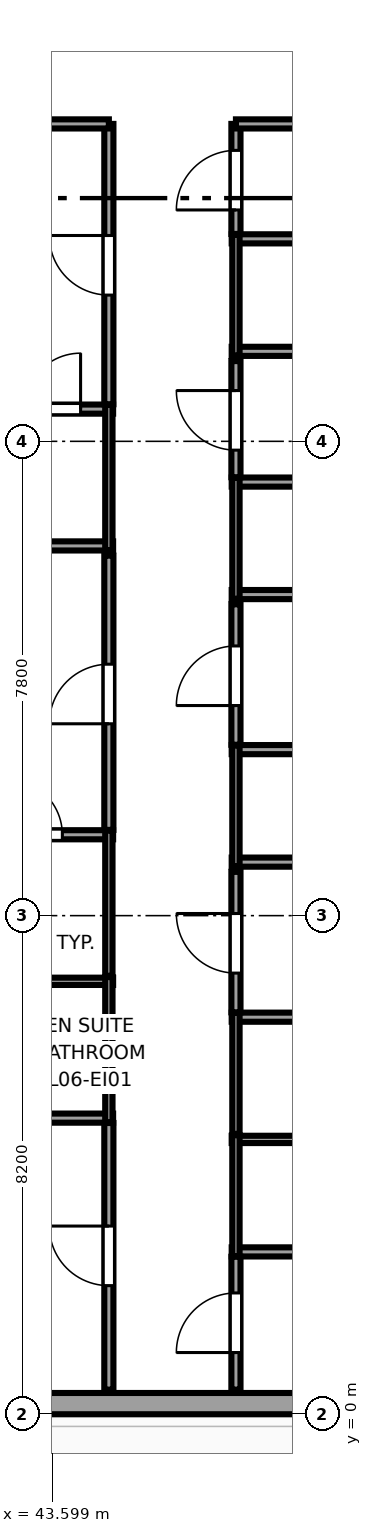
"""IFC4 building model, lengths in metres.
Left out: names, types, materials, properties, quantities, classifications, styles, units other than length and angle.
Written with IfcOpenShell. Run it as: python <this file> out.ifc"""

import sys

from ifc_helpers import new_model, si_unit, direction, frame, frame_2d, origin, place, context, subcontext, project, spatial, rectangle, extrude, source, transform, mapped, element, fill, save


model = new_model("IFC4")
c1 = context("Model", 3, precision=1e-05, world=origin(), true_north=direction((0.0, 1.0)))
c2 = subcontext(c1, "Body", "Model", "MODEL_VIEW")
j1 = project(units=[si_unit("LENGTHUNIT", "METRE"), si_unit("PLANEANGLEUNIT", "RADIAN")], contexts=[c1])
p1 = place(None, origin())
s1 = spatial("IfcSite", under=j1, at=p1, CompositionType="ELEMENT")
p2 = place(p1, origin())
s2 = spatial("IfcBuilding", under=s1, at=p2, CompositionType="ELEMENT")
p3 = place(p2, frame((0.0, 0.0, 32.0)))
s3 = spatial("IfcBuildingStorey", under=s2, at=p3, CompositionType="ELEMENT", Elevation=32.0)
p4 = place(p3, frame((34.375, 0.175, 0.0), z_axis=(0.0, 0.0, 1.0), x_axis=(1.0, 0.0, 0.0)))
e1 = element("IfcWall", 1, at=p4, inside=s3, PredefinedType="SOLIDWALL", context=c2, shape_type="SweptSolid", body=[
    extrude(rectangle(XDim=18.008, YDim=0.35, at=frame_2d((9.004, 0.0))), origin(), (0.0, 0.0, 1.0), 3.37),
])
p5 = place(p4, frame((1.651, 0.0, 0.68)))
e2 = element("IfcOpeningElement", 2, at=p5, cuts=e1, PredefinedType="OPENING", context=c2, shape_type="SweptSolid", body=[
    extrude(rectangle(XDim=2.1, YDim=1.9, at=frame_2d((1.05, 0.95))), frame((0.0, 0.185, 0.0), z_axis=(0.0, -1.0, 0.0), x_axis=(1.0, 0.0, 0.0)), (0.0, 0.0, 1.0), 0.37),
])
p6 = place(p4, frame((15.725, 0.0, 0.62)))
e3 = element("IfcOpeningElement", 3, at=p6, cuts=e1, PredefinedType="OPENING", context=c2, shape_type="SweptSolid", body=[
    extrude(rectangle(XDim=1.5, YDim=1.55, at=frame_2d((0.75, 0.775))), frame((0.0, 0.185, 0.0), z_axis=(0.0, -1.0, 0.0), x_axis=(1.0, 0.0, 0.0)), (0.0, 0.0, 1.0), 0.37),
])
p7 = place(p3, frame((42.01, 4.87, 0.0), z_axis=(0.0, 0.0, 1.0), x_axis=(1.0, 0.0, 0.0)))
e4 = element("IfcWall", 4, at=p7, inside=s3, PredefinedType="PARTITIONING", context=c2, shape_type="SweptSolid", body=[
    extrude(rectangle(XDim=2.59, YDim=0.15, at=frame_2d((1.295, 0.0))), origin(), (0.0, 0.0, 1.0), 3.37),
])
p8 = place(p3, frame((42.01, 7.12, 0.0), z_axis=(0.0, 0.0, 1.0), x_axis=(1.0, 0.0, 0.0)))
e5 = element("IfcWall", 5, at=p8, inside=s3, PredefinedType="PLUMBINGWALL", context=c2, shape_type="SweptSolid", body=[
    extrude(rectangle(XDim=2.59, YDim=0.12, at=frame_2d((1.295, 0.0))), origin(), (0.0, 0.0, 1.0), 3.37),
])
p9 = place(p3, frame((44.53, 4.8, 0.0), z_axis=(0.0, 0.0, 1.0), x_axis=(0.0, 1.0, 0.0)))
e6 = element("IfcWall", 6, at=p9, inside=s3, PredefinedType="PLUMBINGWALL", context=c2, shape_type="SweptSolid", body=[
    extrude(rectangle(XDim=2.39, YDim=0.12, at=frame_2d((1.195, 0.0))), origin(), (0.0, 0.0, 1.0), 3.37),
])
p10 = place(p3, frame((42.01, 9.53, 0.0), z_axis=(0.0, 0.0, 1.0), x_axis=(1.0, 0.0, 0.0)))
e7 = element("IfcWall", 7, at=p10, inside=s3, PredefinedType="PARTITIONING", context=c2, shape_type="SweptSolid", body=[
    extrude(rectangle(XDim=2.59, YDim=0.15, at=frame_2d((1.295, 0.0))), origin(), (0.0, 0.0, 1.0), 3.37),
])
p11 = place(p10, frame((0.835, 0.0, 0.0)))
e8 = element("IfcOpeningElement", 8, at=p11, cuts=e7, PredefinedType="OPENING", context=c2, shape_type="SweptSolid", body=[
    extrude(rectangle(XDim=0.92, YDim=2.01, at=frame_2d((0.46, 1.005))), frame((0.0, 0.085, 0.0), z_axis=(0.0, -1.0, 0.0), x_axis=(1.0, 0.0, 0.0)), (0.0, 0.0, 1.0), 0.17),
])
p12 = place(p3, frame((44.53, 7.21, 0.0), z_axis=(0.0, 0.0, 1.0), x_axis=(0.0, 1.0, 0.0)))
e9 = element("IfcWall", 9, at=p12, inside=s3, PredefinedType="PLUMBINGWALL", context=c2, shape_type="SweptSolid", body=[
    extrude(rectangle(XDim=2.39, YDim=0.12, at=frame_2d((1.195, 0.0))), origin(), (0.0, 0.0, 1.0), 3.37),
])
p13 = place(p3, frame((34.65, 14.28, 0.0), z_axis=(0.0, 0.0, 1.0), x_axis=(1.0, 0.0, 0.0)))
e10 = element("IfcWall", 10, at=p13, inside=s3, PredefinedType="PARTITIONING", context=c2, shape_type="SweptSolid", body=[
    extrude(rectangle(XDim=9.95, YDim=0.15, at=frame_2d((4.975, 0.0))), origin(), (0.0, 0.0, 1.0), 3.37),
])
p14 = place(p3, frame((42.01, 16.53, 0.0), z_axis=(0.0, 0.0, 1.0), x_axis=(1.0, 0.0, 0.0)))
e11 = element("IfcWall", 11, at=p14, inside=s3, PredefinedType="PARTITIONING", context=c2, shape_type="SweptSolid", body=[
    extrude(rectangle(XDim=2.59, YDim=0.15, at=frame_2d((1.295, 0.0))), origin(), (0.0, 0.0, 1.0), 3.37),
])
p15 = place(p14, frame((1.135, 0.0, 0.0)))
e12 = element("IfcOpeningElement", 12, at=p15, cuts=e11, PredefinedType="OPENING", context=c2, shape_type="SweptSolid", body=[
    extrude(rectangle(XDim=0.92, YDim=2.01, at=frame_2d((0.46, 1.005))), frame((0.0, 0.085, 0.0), z_axis=(0.0, -1.0, 0.0), x_axis=(1.0, 0.0, 0.0)), (0.0, 0.0, 1.0), 0.17),
])
p16 = place(p3, frame((44.53, 14.21, 0.0), z_axis=(0.0, 0.0, 1.0), x_axis=(0.0, 1.0, 0.0)))
e13 = element("IfcWall", 13, at=p16, inside=s3, PredefinedType="PLUMBINGWALL", context=c2, shape_type="SweptSolid", body=[
    extrude(rectangle(XDim=2.39, YDim=0.12, at=frame_2d((1.195, 0.0))), origin(), (0.0, 0.0, 1.0), 3.37),
])
p17 = place(p3, frame((46.55, 2.67, 0.0), z_axis=(0.0, 0.0, 1.0), x_axis=(1.0, 0.0, 0.0)))
e14 = element("IfcWall", 14, at=p17, inside=s3, PredefinedType="PARTITIONING", context=c2, shape_type="SweptSolid", body=[
    extrude(rectangle(XDim=2.59, YDim=0.15, at=frame_2d((1.295, 0.0))), origin(), (0.0, 0.0, 1.0), 3.37),
])
p18 = place(p3, frame((46.55, 4.52, 0.0), z_axis=(0.0, 0.0, 1.0), x_axis=(1.0, 0.0, 0.0)))
e15 = element("IfcWall", 15, at=p18, inside=s3, PredefinedType="PLUMBINGWALL", context=c2, shape_type="SweptSolid", body=[
    extrude(rectangle(XDim=2.59, YDim=0.12, at=frame_2d((1.295, 0.0))), origin(), (0.0, 0.0, 1.0), 3.37),
])
p19 = place(p3, frame((46.62, 2.6, 0.0), z_axis=(0.0, 0.0, 1.0), x_axis=(0.0, 1.0, 0.0)))
e16 = element("IfcWall", 16, at=p19, inside=s3, PredefinedType="PLUMBINGWALL", context=c2, shape_type="SweptSolid", body=[
    extrude(rectangle(XDim=1.99, YDim=0.12, at=frame_2d((0.995, 0.0))), origin(), (0.0, 0.0, 1.0), 3.37),
])
p20 = place(p3, frame((46.55, 6.53, 0.0), z_axis=(0.0, 0.0, 1.0), x_axis=(1.0, 0.0, 0.0)))
e17 = element("IfcWall", 17, at=p20, inside=s3, PredefinedType="PARTITIONING", context=c2, shape_type="SweptSolid", body=[
    extrude(rectangle(XDim=2.59, YDim=0.15, at=frame_2d((1.295, 0.0))), origin(), (0.0, 0.0, 1.0), 3.37),
])
p21 = place(p3, frame((46.62, 4.61, 0.0), z_axis=(0.0, 0.0, 1.0), x_axis=(0.0, 1.0, 0.0)))
e18 = element("IfcWall", 18, at=p21, inside=s3, PredefinedType="PLUMBINGWALL", context=c2, shape_type="SweptSolid", body=[
    extrude(rectangle(XDim=1.99, YDim=0.12, at=frame_2d((0.995, 0.0))), origin(), (0.0, 0.0, 1.0), 3.37),
])
p22 = place(p3, frame((46.55, 9.08, 0.0), z_axis=(0.0, 0.0, 1.0), x_axis=(1.0, 0.0, 0.0)))
e19 = element("IfcWall", 19, at=p22, inside=s3, PredefinedType="PARTITIONING", context=c2, shape_type="SweptSolid", body=[
    extrude(rectangle(XDim=10.045, YDim=0.15, at=frame_2d((5.022, 0.0))), origin(), (0.0, 0.0, 1.0), 3.37),
])
p23 = place(p3, frame((46.55, 10.93, 0.0), z_axis=(0.0, 0.0, 1.0), x_axis=(1.0, 0.0, 0.0)))
e20 = element("IfcWall", 20, at=p23, inside=s3, PredefinedType="PARTITIONING", context=c2, shape_type="SweptSolid", body=[
    extrude(rectangle(XDim=2.59, YDim=0.15, at=frame_2d((1.295, 0.0))), origin(), (0.0, 0.0, 1.0), 3.37),
])
p24 = place(p3, frame((46.62, 9.01, 0.0), z_axis=(0.0, 0.0, 1.0), x_axis=(0.0, 1.0, 0.0)))
e21 = element("IfcWall", 21, at=p24, inside=s3, PredefinedType="PLUMBINGWALL", context=c2, shape_type="SweptSolid", body=[
    extrude(rectangle(XDim=1.99, YDim=0.12, at=frame_2d((0.995, 0.0))), origin(), (0.0, 0.0, 1.0), 3.37),
])
p25 = place(p3, frame((46.55, 13.48, 0.0), z_axis=(0.0, 0.0, 1.0), x_axis=(1.0, 0.0, 0.0)))
e22 = element("IfcWall", 22, at=p25, inside=s3, PredefinedType="PARTITIONING", context=c2, shape_type="SweptSolid", body=[
    extrude(rectangle(XDim=10.045, YDim=0.15, at=frame_2d((5.022, 0.0))), origin(), (0.0, 0.0, 1.0), 3.37),
])
p26 = place(p3, frame((46.55, 15.33, 0.0), z_axis=(0.0, 0.0, 1.0), x_axis=(1.0, 0.0, 0.0)))
e23 = element("IfcWall", 23, at=p26, inside=s3, PredefinedType="PARTITIONING", context=c2, shape_type="SweptSolid", body=[
    extrude(rectangle(XDim=2.59, YDim=0.15, at=frame_2d((1.295, 0.0))), origin(), (0.0, 0.0, 1.0), 3.37),
])
p27 = place(p3, frame((46.62, 13.41, 0.0), z_axis=(0.0, 0.0, 1.0), x_axis=(0.0, 1.0, 0.0)))
e24 = element("IfcWall", 24, at=p27, inside=s3, PredefinedType="PLUMBINGWALL", context=c2, shape_type="SweptSolid", body=[
    extrude(rectangle(XDim=1.99, YDim=0.12, at=frame_2d((0.995, 0.0))), origin(), (0.0, 0.0, 1.0), 3.37),
])
p28 = place(p3, frame((46.55, 17.48, 0.0), z_axis=(0.0, 0.0, 1.0), x_axis=(1.0, 0.0, 0.0)))
e25 = element("IfcWall", 25, at=p28, inside=s3, PredefinedType="PARTITIONING", context=c2, shape_type="SweptSolid", body=[
    extrude(rectangle(XDim=10.045, YDim=0.15, at=frame_2d((5.022, 0.0))), origin(), (0.0, 0.0, 1.0), 3.37),
])
p29 = place(p3, frame((46.55, 19.33, 0.0), z_axis=(0.0, 0.0, 1.0), x_axis=(1.0, 0.0, 0.0)))
e26 = element("IfcWall", 26, at=p29, inside=s3, PredefinedType="PARTITIONING", context=c2, shape_type="SweptSolid", body=[
    extrude(rectangle(XDim=2.59, YDim=0.15, at=frame_2d((1.295, 0.0))), origin(), (0.0, 0.0, 1.0), 3.37),
])
p30 = place(p3, frame((46.62, 17.41, 0.0), z_axis=(0.0, 0.0, 1.0), x_axis=(0.0, 1.0, 0.0)))
e27 = element("IfcWall", 27, at=p30, inside=s3, PredefinedType="PLUMBINGWALL", context=c2, shape_type="SweptSolid", body=[
    extrude(rectangle(XDim=1.99, YDim=0.12, at=frame_2d((0.995, 0.0))), origin(), (0.0, 0.0, 1.0), 3.37),
])
p31 = place(p3, frame((44.53, 0.405, 0.0), z_axis=(0.0, 0.0, 1.0), x_axis=(0.0, 1.0, 0.0)))
e28 = element("IfcWall", 28, at=p31, inside=s3, PredefinedType="PARTITIONING", context=c2, shape_type="SweptSolid", body=[
    extrude(rectangle(XDim=4.385, YDim=0.15, at=frame_2d((2.192, 0.0))), origin(), (0.0, 0.0, 1.0), 3.37),
])
p32 = place(p31, frame((1.71, 0.0, 0.0)))
e29 = element("IfcOpeningElement", 29, at=p32, cuts=e28, PredefinedType="OPENING", context=c2, shape_type="SweptSolid", body=[
    extrude(rectangle(XDim=0.98, YDim=2.12, at=frame_2d((0.49, 1.06))), frame((0.0, 0.085, 0.0), z_axis=(0.0, -1.0, 0.0), x_axis=(1.0, 0.0, 0.0)), (0.0, 0.0, 1.0), 0.17),
])
p33 = place(p3, frame((44.53, 9.61, 0.0), z_axis=(0.0, 0.0, 1.0), x_axis=(0.0, 1.0, 0.0)))
e30 = element("IfcWall", 30, at=p33, inside=s3, PredefinedType="PARTITIONING", context=c2, shape_type="SweptSolid", body=[
    extrude(rectangle(XDim=4.51, YDim=0.15, at=frame_2d((2.255, 0.0))), origin(), (0.0, 0.0, 1.0), 3.37),
])
p34 = place(p33, frame((1.745, 0.0, 0.0)))
e31 = element("IfcOpeningElement", 31, at=p34, cuts=e30, PredefinedType="OPENING", context=c2, shape_type="SweptSolid", body=[
    extrude(rectangle(XDim=0.98, YDim=2.12, at=frame_2d((0.49, 1.06))), frame((0.0, 0.085, 0.0), z_axis=(0.0, -1.0, 0.0), x_axis=(1.0, 0.0, 0.0)), (0.0, 0.0, 1.0), 0.17),
])
p35 = place(p3, frame((44.53, 16.61, 0.0), z_axis=(0.0, 0.0, 1.0), x_axis=(0.0, 1.0, 0.0)))
e32 = element("IfcWall", 32, at=p35, inside=s3, PredefinedType="PARTITIONING", context=c2, shape_type="SweptSolid", body=[
    extrude(rectangle(XDim=4.61, YDim=0.15, at=frame_2d((2.305, 0.0))), origin(), (0.0, 0.0, 1.0), 3.37),
])
p36 = place(p35, frame((1.795, 0.0, 0.0)))
e33 = element("IfcOpeningElement", 33, at=p36, cuts=e32, PredefinedType="OPENING", context=c2, shape_type="SweptSolid", body=[
    extrude(rectangle(XDim=0.98, YDim=2.12, at=frame_2d((0.49, 1.06))), frame((0.0, 0.085, 0.0), z_axis=(0.0, -1.0, 0.0), x_axis=(1.0, 0.0, 0.0)), (0.0, 0.0, 1.0), 0.17),
])
p37 = place(p3, frame((34.65, 21.22, 0.0), z_axis=(0.0, 0.0, 1.0), x_axis=(1.0, 0.0, 0.0)))
e34 = element("IfcWall", 34, at=p37, inside=s3, PredefinedType="PARTITIONING", context=c2, shape_type="SweptSolid", body=[
    extrude(rectangle(XDim=9.88, YDim=0.15, at=frame_2d((4.94, 0.0))), origin(), (0.0, 0.0, 1.0), 3.37),
])
p38 = place(p3, frame((46.62, 0.405, 0.0), z_axis=(0.0, 0.0, 1.0), x_axis=(0.0, 1.0, 0.0)))
e35 = element("IfcWall", 35, at=p38, inside=s3, PredefinedType="PARTITIONING", context=c2, shape_type="SweptSolid", body=[
    extrude(rectangle(XDim=2.185, YDim=0.15, at=frame_2d((1.093, 0.0))), origin(), (0.0, 0.0, 1.0), 3.37),
])
p39 = place(p38, frame((0.61, 0.0, 0.0)))
e36 = element("IfcOpeningElement", 36, at=p39, cuts=e35, PredefinedType="OPENING", context=c2, shape_type="SweptSolid", body=[
    extrude(rectangle(XDim=0.98, YDim=2.12, at=frame_2d((0.49, 1.06))), frame((0.0, 0.085, 0.0), z_axis=(0.0, -1.0, 0.0), x_axis=(1.0, 0.0, 0.0)), (0.0, 0.0, 1.0), 0.17),
])
p40 = place(p3, frame((46.62, 6.61, 0.0), z_axis=(0.0, 0.0, 1.0), x_axis=(0.0, 1.0, 0.0)))
e37 = element("IfcWall", 37, at=p40, inside=s3, PredefinedType="PARTITIONING", context=c2, shape_type="SweptSolid", body=[
    extrude(rectangle(XDim=2.31, YDim=0.15, at=frame_2d((1.155, 0.0))), origin(), (0.0, 0.0, 1.0), 3.37),
])
p41 = place(p40, frame((0.645, 0.0, 0.0)))
e38 = element("IfcOpeningElement", 38, at=p41, cuts=e37, PredefinedType="OPENING", context=c2, shape_type="SweptSolid", body=[
    extrude(rectangle(XDim=0.98, YDim=2.12, at=frame_2d((0.49, 1.06))), frame((0.0, 0.085, 0.0), z_axis=(0.0, -1.0, 0.0), x_axis=(1.0, 0.0, 0.0)), (0.0, 0.0, 1.0), 0.17),
])
p42 = place(p3, frame((46.62, 11.01, 0.0), z_axis=(0.0, 0.0, 1.0), x_axis=(0.0, 1.0, 0.0)))
e39 = element("IfcWall", 39, at=p42, inside=s3, PredefinedType="PARTITIONING", context=c2, shape_type="SweptSolid", body=[
    extrude(rectangle(XDim=2.31, YDim=0.15, at=frame_2d((1.155, 0.0))), origin(), (0.0, 0.0, 1.0), 3.37),
])
p43 = place(p42, frame((0.645, 0.0, 0.0)))
e40 = element("IfcOpeningElement", 40, at=p43, cuts=e39, PredefinedType="OPENING", context=c2, shape_type="SweptSolid", body=[
    extrude(rectangle(XDim=0.98, YDim=2.12, at=frame_2d((0.49, 1.06))), frame((0.0, 0.085, 0.0), z_axis=(0.0, -1.0, 0.0), x_axis=(1.0, 0.0, 0.0)), (0.0, 0.0, 1.0), 0.17),
])
p44 = place(p3, frame((46.62, 15.41, 0.0), z_axis=(0.0, 0.0, 1.0), x_axis=(0.0, 1.0, 0.0)))
e41 = element("IfcWall", 41, at=p44, inside=s3, PredefinedType="PARTITIONING", context=c2, shape_type="SweptSolid", body=[
    extrude(rectangle(XDim=1.91, YDim=0.15, at=frame_2d((0.955, 0.0))), origin(), (0.0, 0.0, 1.0), 3.37),
])
p45 = place(p44, frame((0.445, 0.0, 0.0)))
e42 = element("IfcOpeningElement", 42, at=p45, cuts=e41, PredefinedType="OPENING", context=c2, shape_type="SweptSolid", body=[
    extrude(rectangle(XDim=0.98, YDim=2.12, at=frame_2d((0.49, 1.06))), frame((0.0, 0.085, 0.0), z_axis=(0.0, -1.0, 0.0), x_axis=(1.0, 0.0, 0.0)), (0.0, 0.0, 1.0), 0.17),
])
p46 = place(p3, frame((46.62, 19.41, 0.0), z_axis=(0.0, 0.0, 1.0), x_axis=(0.0, 1.0, 0.0)))
e43 = element("IfcWall", 43, at=p46, inside=s3, PredefinedType="PARTITIONING", context=c2, shape_type="SweptSolid", body=[
    extrude(rectangle(XDim=1.81, YDim=0.15, at=frame_2d((0.905, 0.0))), origin(), (0.0, 0.0, 1.0), 3.37),
])
p47 = place(p46, frame((0.395, 0.0, 0.0)))
e44 = element("IfcOpeningElement", 44, at=p47, cuts=e43, PredefinedType="OPENING", context=c2, shape_type="SweptSolid", body=[
    extrude(rectangle(XDim=0.98, YDim=2.12, at=frame_2d((0.49, 1.06))), frame((0.0, 0.085, 0.0), z_axis=(0.0, -1.0, 0.0), x_axis=(1.0, 0.0, 0.0)), (0.0, 0.0, 1.0), 0.17),
])
p48 = place(p3, frame((46.62, 21.22, 0.0), z_axis=(0.0, 0.0, 1.0), x_axis=(1.0, 0.0, 0.0)))
e45 = element("IfcWall", 45, at=p48, inside=s3, PredefinedType="PARTITIONING", context=c2, shape_type="SweptSolid", body=[
    extrude(rectangle(XDim=9.975, YDim=0.15, at=frame_2d((4.987, 0.0))), origin(), (0.0, 0.0, 1.0), 3.37),
])
m1 = source(origin(), c2, "Body", "SweptSolid", [
    extrude(rectangle(XDim=0.92, YDim=2.01, at=frame_2d((0.46, 1.005))), frame((0.0, 0.025, 0.0), z_axis=(0.0, -1.0, 0.0), x_axis=(1.0, 0.0, 0.0)), (0.0, 0.0, 1.0), 0.05),
])
p49 = place(p11, origin())
e46 = element("IfcDoor", 46, at=p49, inside=s3, OperationType="SINGLE_SWING_LEFT", PredefinedType="DOOR", context=c2, shape_type="MappedRepresentation", body=[
    mapped(m1, transform((0.0, 0.0, 0.0), x_axis=(1.0, 0.0, 0.0), y_axis=(0.0, 1.0, 0.0), z_axis=(0.0, 0.0, 1.0), scale=1.0)),
])
fill(e8, e46)
p50 = place(p15, origin())
e47 = element("IfcDoor", 47, at=p50, inside=s3, OperationType="SINGLE_SWING_RIGHT", PredefinedType="DOOR", context=c2, shape_type="MappedRepresentation", body=[
    mapped(m1, transform((0.0, 0.0, 0.0), x_axis=(1.0, 0.0, 0.0), y_axis=(0.0, 1.0, 0.0), z_axis=(0.0, 0.0, 1.0), scale=1.0)),
])
fill(e12, e47)
m2 = source(origin(), c2, "Body", "SweptSolid", [
    extrude(rectangle(XDim=0.98, YDim=2.12, at=frame_2d((0.49, 1.06))), frame((0.0, 0.025, 0.0), z_axis=(0.0, -1.0, 0.0), x_axis=(1.0, 0.0, 0.0)), (0.0, 0.0, 1.0), 0.05),
])
p51 = place(p32, origin())
e48 = element("IfcDoor", 48, at=p51, inside=s3, OperationType="SINGLE_SWING_RIGHT", PredefinedType="DOOR", context=c2, shape_type="MappedRepresentation", body=[
    mapped(m2, transform((0.0, 0.0, 0.0), x_axis=(1.0, 0.0, 0.0), y_axis=(0.0, 1.0, 0.0), z_axis=(0.0, 0.0, 1.0), scale=1.0)),
])
fill(e29, e48)
p52 = place(p34, origin())
e49 = element("IfcDoor", 49, at=p52, inside=s3, OperationType="SINGLE_SWING_LEFT", PredefinedType="DOOR", context=c2, shape_type="MappedRepresentation", body=[
    mapped(m2, transform((0.0, 0.0, 0.0), x_axis=(1.0, 0.0, 0.0), y_axis=(0.0, 1.0, 0.0), z_axis=(0.0, 0.0, 1.0), scale=1.0)),
])
fill(e31, e49)
p53 = place(p36, origin())
e50 = element("IfcDoor", 50, at=p53, inside=s3, OperationType="SINGLE_SWING_RIGHT", PredefinedType="DOOR", context=c2, shape_type="MappedRepresentation", body=[
    mapped(m2, transform((0.0, 0.0, 0.0), x_axis=(1.0, 0.0, 0.0), y_axis=(0.0, 1.0, 0.0), z_axis=(0.0, 0.0, 1.0), scale=1.0)),
])
fill(e33, e50)
p54 = place(p39, origin())
e51 = element("IfcDoor", 51, at=p54, inside=s3, OperationType="SINGLE_SWING_LEFT", PredefinedType="DOOR", context=c2, shape_type="MappedRepresentation", body=[
    mapped(m2, transform((0.0, 0.0, 0.0), x_axis=(1.0, 0.0, 0.0), y_axis=(0.0, 1.0, 0.0), z_axis=(0.0, 0.0, 1.0), scale=1.0)),
])
fill(e36, e51)
p55 = place(p41, origin())
e52 = element("IfcDoor", 52, at=p55, inside=s3, OperationType="SINGLE_SWING_RIGHT", PredefinedType="DOOR", context=c2, shape_type="MappedRepresentation", body=[
    mapped(m2, transform((0.0, 0.0, 0.0), x_axis=(1.0, 0.0, 0.0), y_axis=(0.0, 1.0, 0.0), z_axis=(0.0, 0.0, 1.0), scale=1.0)),
])
fill(e38, e52)
p56 = place(p43, origin())
e53 = element("IfcDoor", 53, at=p56, inside=s3, OperationType="SINGLE_SWING_LEFT", PredefinedType="DOOR", context=c2, shape_type="MappedRepresentation", body=[
    mapped(m2, transform((0.0, 0.0, 0.0), x_axis=(1.0, 0.0, 0.0), y_axis=(0.0, 1.0, 0.0), z_axis=(0.0, 0.0, 1.0), scale=1.0)),
])
fill(e40, e53)
p57 = place(p45, origin())
e54 = element("IfcDoor", 54, at=p57, inside=s3, OperationType="SINGLE_SWING_RIGHT", PredefinedType="DOOR", context=c2, shape_type="MappedRepresentation", body=[
    mapped(m2, transform((0.0, 0.0, 0.0), x_axis=(1.0, 0.0, 0.0), y_axis=(0.0, 1.0, 0.0), z_axis=(0.0, 0.0, 1.0), scale=1.0)),
])
fill(e42, e54)
p58 = place(p47, origin())
e55 = element("IfcDoor", 55, at=p58, inside=s3, OperationType="SINGLE_SWING_LEFT", PredefinedType="DOOR", context=c2, shape_type="MappedRepresentation", body=[
    mapped(m2, transform((0.0, 0.0, 0.0), x_axis=(1.0, 0.0, 0.0), y_axis=(0.0, 1.0, 0.0), z_axis=(0.0, 0.0, 1.0), scale=1.0)),
])
fill(e44, e55)
save(model, sys.argv[1])
